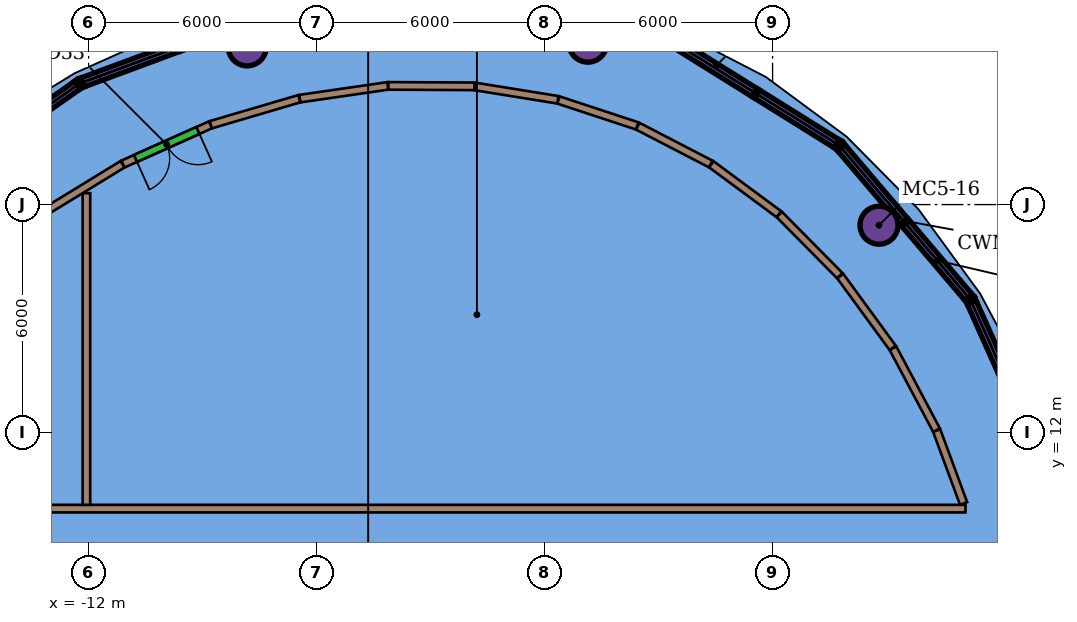
"""IFC4 building model, lengths in metres.
Left out: names, types, materials, properties, quantities, classifications, styles, units other than length and angle.
Written with IfcOpenShell. Run it as: python <this file> out.ifc"""

import sys

from ifc_helpers import new_model, si_unit, direction, frame, frame_2d, origin, origin_2d, place, context, subcontext, project, spatial, rectangle, hollow_circle, extrude, element, fill, save


model = new_model("IFC4")
c1 = context("Model", 3, precision=1e-05, world=origin(), true_north=direction((0.0, 1.0)))
c2 = subcontext(c1, "Body", "Model", "MODEL_VIEW")
j1 = project(units=[si_unit("LENGTHUNIT", "METRE"), si_unit("PLANEANGLEUNIT", "RADIAN")], contexts=[c1])
p1 = place(None, origin())
s1 = spatial("IfcSite", under=j1, at=p1, CompositionType="ELEMENT")
p2 = place(p1, origin())
s2 = spatial("IfcBuilding", under=s1, at=p2, CompositionType="ELEMENT")
p3 = place(p2, frame((0.0, 0.0, 325.5)))
s3 = spatial("IfcBuildingStorey", under=s2, at=p3, CompositionType="ELEMENT", Elevation=325.5)
for number, where, z_axis, x_axis in (
    (1, (1.138, 22.247, 0.0), (0.0, 0.0, 1.0), (1.0, 0.0, 0.0)),
    (2, (-7.825, 22.149, 0.0), (0.0, 0.0, 1.0), (1.0, 0.0, 0.0)),
    (3, (8.8, 17.457, 0.0), (0.0, 0.0, 1.0), (1.0, 0.0, 0.0)),
):
    element("IfcColumn", number, at=place(p3, frame(where, z_axis=z_axis, x_axis=x_axis)), inside=s3, PredefinedType="COLUMN", context=c2, shape_type="SweptSolid", body=[
        extrude(hollow_circle(Radius=0.5, WallThickness=0.04, at=origin_2d()), origin(), (0.0, 0.0, 1.0), 3.75),
    ])
p4 = place(p3, frame((-17.9, 10.0, 0.0), z_axis=(0.0, 0.0, 1.0), x_axis=(1.0, 0.0, 0.0)))
e4 = element("IfcWall", 4, at=p4, inside=s3, PredefinedType="PARTITIONING", context=c2, shape_type="SweptSolid", body=[
    extrude(rectangle(XDim=28.976, YDim=0.2, at=frame_2d((14.488, 0.0))), origin(), (0.0, 0.0, 1.0), 3.25),
])
p5 = place(p3, frame((-12.056, 10.1, 0.0), z_axis=(0.0, 0.0, 1.0), x_axis=(0.0, 1.0, 0.0)))
e5 = element("IfcWall", 5, at=p5, inside=s3, PredefinedType="PARTITIONING", context=c2, shape_type="SweptSolid", body=[
    extrude(rectangle(XDim=8.2, YDim=0.2, at=frame_2d((4.1, 0.0))), origin(), (0.0, 0.0, 1.0), 3.25),
])
p6 = place(p3, frame((-13.334, 17.696, 0.0), z_axis=(0.0, 0.0, 1.0), x_axis=(0.852667029926, 0.522454721557, 0.0)))
e6 = element("IfcWall", 6, at=p6, inside=s3, PredefinedType="PARTITIONING", context=c2, shape_type="SweptSolid", body=[
    extrude(rectangle(XDim=2.614, YDim=0.2, at=frame_2d((1.307, 0.0))), origin(), (0.0, 0.0, 1.0), 3.25),
])
p7 = place(p3, frame((7.78, 16.119, 0.0), z_axis=(0.0, 0.0, 1.0), x_axis=(0.590082027637, -0.807343297897, 0.0)))
e7 = element("IfcWall", 7, at=p7, inside=s3, PredefinedType="PARTITIONING", context=c2, shape_type="SweptSolid", body=[
    extrude(rectangle(XDim=2.338, YDim=0.2, at=frame_2d((1.169, 0.0))), origin(), (0.0, 0.0, 1.0), 3.25),
])
p8 = place(p3, frame((9.168, 14.219, 0.0), z_axis=(0.0, 0.0, 1.0), x_axis=(0.469606334902, -0.882875920059, 0.0)))
e8 = element("IfcWall", 8, at=p8, inside=s3, PredefinedType="PARTITIONING", context=c2, shape_type="SweptSolid", body=[
    extrude(rectangle(XDim=2.44, YDim=0.2, at=frame_2d((1.22, 0.0))), origin(), (0.0, 0.0, 1.0), 3.25),
])
p9 = place(p3, frame((10.319, 12.052, 0.0), z_axis=(0.0, 0.0, 1.0), x_axis=(0.346197844841, -0.938161527791, 0.0)))
e9 = element("IfcWall", 9, at=p9, inside=s3, PredefinedType="PARTITIONING", context=c2, shape_type="SweptSolid", body=[
    extrude(rectangle(XDim=2.044, YDim=0.2, at=frame_2d((1.022, 0.0))), origin(), (0.0, 0.0, 1.0), 3.25),
])
p10 = place(p3, frame((-8.794, 20.097, 0.0), z_axis=(0.0, 0.0, 1.0), x_axis=(-0.912552955942, -0.408958558538, 0.0)))
e10 = element("IfcWall", 10, at=p10, inside=s3, PredefinedType="PARTITIONING", context=c2, shape_type="SweptSolid", body=[
    extrude(rectangle(XDim=2.521, YDim=0.2, at=frame_2d((1.26, 0.0))), origin(), (0.0, 0.0, 1.0), 3.25),
])
p11 = place(p10, frame((0.36, 0.0, 0.0)))
e11 = element("IfcOpeningElement", 11, at=p11, cuts=e10, PredefinedType="OPENING", context=c2, shape_type="SweptSolid", body=[
    extrude(rectangle(XDim=1.8, YDim=2.4, at=frame_2d((0.9, 1.2))), frame((0.0, 0.11, 0.0), z_axis=(0.0, -1.0, 0.0), x_axis=(1.0, 0.0, 0.0)), (0.0, 0.0, 1.0), 0.22),
])
p12 = place(p3, frame((-8.781, 20.101, 0.0), z_axis=(0.0, 0.0, 1.0), x_axis=(0.95934146389, 0.28224803925, 0.0)))
e12 = element("IfcWall", 12, at=p12, inside=s3, PredefinedType="PARTITIONING", context=c2, shape_type="SweptSolid", body=[
    extrude(rectangle(XDim=2.426, YDim=0.2, at=frame_2d((1.213, 0.0))), origin(), (0.0, 0.0, 1.0), 3.25),
])
p13 = place(p3, frame((-6.439, 20.788, 0.0), z_axis=(0.0, 0.0, 1.0), x_axis=(0.989671979467, 0.143350525141, 0.0)))
e13 = element("IfcWall", 13, at=p13, inside=s3, PredefinedType="PARTITIONING", context=c2, shape_type="SweptSolid", body=[
    extrude(rectangle(XDim=2.338, YDim=0.2, at=frame_2d((1.169, 0.0))), origin(), (0.0, 0.0, 1.0), 3.25),
])
p14 = place(p3, frame((-4.11, 21.123, 0.0), z_axis=(0.0, 0.0, 1.0), x_axis=(0.999986603133, -0.005176248997, 0.0)))
e14 = element("IfcWall", 14, at=p14, inside=s3, PredefinedType="PARTITIONING", context=c2, shape_type="SweptSolid", body=[
    extrude(rectangle(XDim=2.264, YDim=0.2, at=frame_2d((1.132, 0.0))), origin(), (0.0, 0.0, 1.0), 3.25),
])
p15 = place(p3, frame((-1.831, 21.109, 0.0), z_axis=(0.0, 0.0, 1.0), x_axis=(0.987257926423, -0.159128208423, 0.0)))
e15 = element("IfcWall", 15, at=p15, inside=s3, PredefinedType="PARTITIONING", context=c2, shape_type="SweptSolid", body=[
    extrude(rectangle(XDim=2.209, YDim=0.2, at=frame_2d((1.104, 0.0))), origin(), (0.0, 0.0, 1.0), 3.25),
])
p16 = place(p3, frame((0.365, 20.752, 0.0), z_axis=(0.0, 0.0, 1.0), x_axis=(0.949852302688, -0.312698901627, 0.0)))
e16 = element("IfcWall", 16, at=p16, inside=s3, PredefinedType="PARTITIONING", context=c2, shape_type="SweptSolid", body=[
    extrude(rectangle(XDim=2.181, YDim=0.2, at=frame_2d((1.09, 0.0))), origin(), (0.0, 0.0, 1.0), 3.25),
])
p17 = place(p3, frame((2.451, 20.063, 0.0), z_axis=(0.0, 0.0, 1.0), x_axis=(0.888068415533, -0.45971131086, 0.0)))
e17 = element("IfcWall", 17, at=p17, inside=s3, PredefinedType="PARTITIONING", context=c2, shape_type="SweptSolid", body=[
    extrude(rectangle(XDim=2.165, YDim=0.2, at=frame_2d((1.082, 0.0))), origin(), (0.0, 0.0, 1.0), 3.25),
])
p18 = place(p3, frame((4.387, 19.06, 0.0), z_axis=(0.0, 0.0, 1.0), x_axis=(0.80443326696, -0.594043027909, 0.0)))
e18 = element("IfcWall", 18, at=p18, inside=s3, PredefinedType="PARTITIONING", context=c2, shape_type="SweptSolid", body=[
    extrude(rectangle(XDim=2.209, YDim=0.2, at=frame_2d((1.105, 0.0))), origin(), (0.0, 0.0, 1.0), 3.25),
])
p19 = place(p3, frame((6.177, 17.739, 0.0), z_axis=(0.0, 0.0, 1.0), x_axis=(0.703376280453, -0.710817703843, 0.0)))
e19 = element("IfcWall", 19, at=p19, inside=s3, PredefinedType="PARTITIONING", context=c2, shape_type="SweptSolid", body=[
    extrude(rectangle(XDim=2.264, YDim=0.2, at=frame_2d((1.132, 0.0))), origin(), (0.0, 0.0, 1.0), 3.25),
])
p20 = place(p11, origin())
e20 = element("IfcDoor", 20, at=p20, inside=s3, OperationType="DOUBLE_DOOR_SINGLE_SWING", PredefinedType="DOOR", context=c2, shape_type="SweptSolid", body=[
    extrude(rectangle(XDim=1.8, YDim=2.4, at=frame_2d((0.9, 1.2))), frame((0.0, 0.025, 0.0), z_axis=(0.0, -1.0, 0.0), x_axis=(1.0, 0.0, 0.0)), (0.0, 0.0, 1.0), 0.05),
])
fill(e11, e20)
save(model, sys.argv[1])
